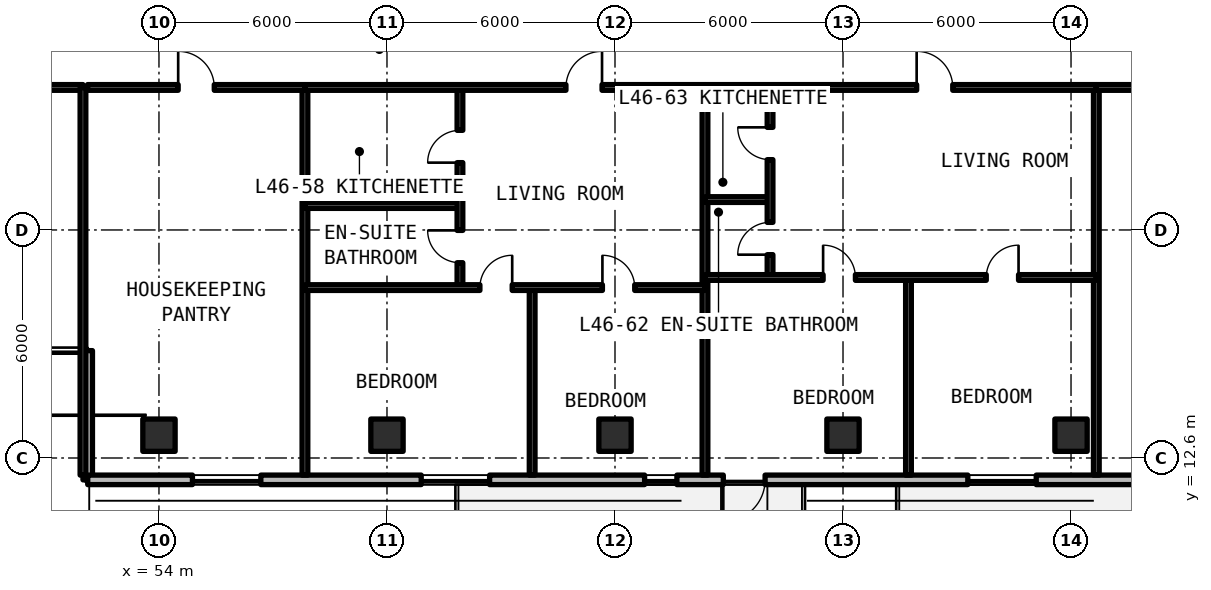
"""IFC4 building model, lengths in metres.
Left out: names, types, materials, properties, quantities, classifications, styles, units other than length and angle.
Written with IfcOpenShell. Run it as: python <this file> out.ifc"""

import sys

from ifc_helpers import new_model, si_unit, direction, frame, frame_2d, origin, origin_2d, place, context, subcontext, project, spatial, rectangle, extrude, element, fill, save


model = new_model("IFC4")
c1 = context("Model", 3, precision=1e-05, world=origin(), true_north=direction((0.0, 1.0)))
c2 = subcontext(c1, "Body", "Model", "MODEL_VIEW")
j1 = project(units=[si_unit("LENGTHUNIT", "METRE"), si_unit("PLANEANGLEUNIT", "RADIAN")], contexts=[c1])
p1 = place(None, origin())
s1 = spatial("IfcSite", under=j1, at=p1, CompositionType="ELEMENT")
p2 = place(p1, origin())
s2 = spatial("IfcBuilding", under=s1, at=p2, CompositionType="ELEMENT")
p3 = place(p2, frame((0.0, 0.0, 165.66)))
s3 = spatial("IfcBuildingStorey", under=s2, at=p3, CompositionType="ELEMENT", Elevation=165.66)
for number, where, z_axis, x_axis in (
    (1, (54.0, 13.2, 0.0), (0.0, 0.0, 1.0), (1.0, 0.0, 0.0)),
    (2, (60.0, 13.2, 0.0), (0.0, 0.0, 1.0), (1.0, 0.0, 0.0)),
    (3, (66.0, 13.2, 0.0), (0.0, 0.0, 1.0), (1.0, 0.0, 0.0)),
    (4, (72.0, 13.2, 0.0), (0.0, 0.0, 1.0), (1.0, 0.0, 0.0)),
    (5, (78.0, 13.2, 0.0), (0.0, 0.0, 1.0), (1.0, 0.0, 0.0)),
):
    element("IfcColumn", number, at=place(p3, frame(where, z_axis=z_axis, x_axis=x_axis)), inside=s3, PredefinedType="COLUMN", context=c2, shape_type="SweptSolid", body=[
        extrude(rectangle(XDim=0.85, YDim=0.85, at=origin_2d()), origin(), (0.0, 0.0, 1.0), 3.63),
    ])
p4 = place(p3, frame((52.125, 15.425, 0.0), z_axis=(0.0, 0.0, 1.0), x_axis=(0.0, -1.0, 0.0)))
e6 = element("IfcWall", 6, at=p4, inside=s3, PredefinedType="SOLIDWALL", context=c2, shape_type="SweptSolid", body=[
    extrude(rectangle(XDim=3.4, YDim=0.25, at=frame_2d((1.7, 0.0))), origin(), (0.0, 0.0, 1.0), 3.41),
])
p5 = place(p3, frame((52.125, 12.025, 0.0), z_axis=(0.0, 0.0, 1.0), x_axis=(1.0, 0.0, 0.0)))
e7 = element("IfcWall", 7, at=p5, inside=s3, PredefinedType="SOLIDWALL", context=c2, shape_type="SweptSolid", body=[
    extrude(rectangle(XDim=43.623, YDim=0.25, at=frame_2d((21.812, 0.0))), origin(), (0.0, 0.0, 1.0), 3.41),
])
p6 = place(p5, frame((16.725, 0.0, 0.0)))
e8 = element("IfcOpeningElement", 8, at=p6, cuts=e7, PredefinedType="OPENING", context=c2, shape_type="SweptSolid", body=[
    extrude(rectangle(XDim=1.1, YDim=2.15, at=frame_2d((0.55, 1.075))), frame((0.0, 0.135, 0.0), z_axis=(0.0, -1.0, 0.0), x_axis=(1.0, 0.0, 0.0)), (0.0, 0.0, 1.0), 0.27),
])
p7 = place(p5, frame((27.575, 0.0, 0.0)))
e9 = element("IfcOpeningElement", 9, at=p7, cuts=e7, PredefinedType="OPENING", context=c2, shape_type="SweptSolid", body=[
    extrude(rectangle(XDim=1.1, YDim=2.15, at=frame_2d((0.55, 1.075))), frame((0.0, 0.135, 0.0), z_axis=(0.0, -1.0, 0.0), x_axis=(1.0, 0.0, 0.0)), (0.0, 0.0, 1.0), 0.27),
])
p8 = place(p5, frame((2.756, 0.0, 0.78)))
e10 = element("IfcOpeningElement", 10, at=p8, cuts=e7, PredefinedType="OPENING", context=c2, shape_type="SweptSolid", body=[
    extrude(rectangle(XDim=1.8, YDim=1.66, at=frame_2d((0.9, 0.83))), frame((0.0, 0.135, 0.0), z_axis=(0.0, -1.0, 0.0), x_axis=(1.0, 0.0, 0.0)), (0.0, 0.0, 1.0), 0.27),
])
p9 = place(p5, frame((8.776, 0.0, 0.78)))
e11 = element("IfcOpeningElement", 11, at=p9, cuts=e7, PredefinedType="OPENING", context=c2, shape_type="SweptSolid", body=[
    extrude(rectangle(XDim=1.8, YDim=1.66, at=frame_2d((0.9, 0.83))), frame((0.0, 0.135, 0.0), z_axis=(0.0, -1.0, 0.0), x_axis=(1.0, 0.0, 0.0)), (0.0, 0.0, 1.0), 0.27),
])
p10 = place(p5, frame((14.654, 0.0, 0.78)))
e12 = element("IfcOpeningElement", 12, at=p10, cuts=e7, PredefinedType="OPENING", context=c2, shape_type="SweptSolid", body=[
    extrude(rectangle(XDim=0.85, YDim=1.65, at=frame_2d((0.425, 0.825))), frame((0.0, 0.135, 0.0), z_axis=(0.0, -1.0, 0.0), x_axis=(1.0, 0.0, 0.0)), (0.0, 0.0, 1.0), 0.27),
])
p11 = place(p5, frame((23.159, 0.0, 0.78)))
e13 = element("IfcOpeningElement", 13, at=p11, cuts=e7, PredefinedType="OPENING", context=c2, shape_type="SweptSolid", body=[
    extrude(rectangle(XDim=1.8, YDim=1.66, at=frame_2d((0.9, 0.83))), frame((0.0, 0.135, 0.0), z_axis=(0.0, -1.0, 0.0), x_axis=(1.0, 0.0, 0.0)), (0.0, 0.0, 1.0), 0.27),
])
p12 = place(p5, frame((38.451, 0.0, 0.78)))
e14 = element("IfcOpeningElement", 14, at=p12, cuts=e7, PredefinedType="OPENING", context=c2, shape_type="SweptSolid", body=[
    extrude(rectangle(XDim=0.85, YDim=1.65, at=frame_2d((0.425, 0.825))), frame((0.0, 0.135, 0.0), z_axis=(0.0, -1.0, 0.0), x_axis=(1.0, 0.0, 0.0)), (0.0, 0.0, 1.0), 0.27),
])
p13 = place(p5, frame((40.725, 0.0, 0.78)))
e15 = element("IfcOpeningElement", 15, at=p13, cuts=e7, PredefinedType="OPENING", context=c2, shape_type="SweptSolid", body=[
    extrude(rectangle(XDim=1.8, YDim=1.66, at=frame_2d((0.9, 0.83))), frame((0.0, 0.135, 0.0), z_axis=(0.0, -1.0, 0.0), x_axis=(1.0, 0.0, 0.0)), (0.0, 0.0, 1.0), 0.27),
])
p14 = place(p3, frame((43.6, 22.35, 0.0), z_axis=(0.0, 0.0, 1.0), x_axis=(1.0, 0.0, 0.0)))
e16 = element("IfcWall", 16, at=p14, inside=s3, PredefinedType="SOLIDWALL", context=c2, shape_type="SweptSolid", body=[
    extrude(rectangle(XDim=8.4, YDim=0.15, at=frame_2d((4.2, 0.0))), origin(), (0.0, 0.0, 1.0), 2.63),
])
p15 = place(p14, frame((3.65, 0.0, 0.0)))
e17 = element("IfcOpeningElement", 17, at=p15, cuts=e16, PredefinedType="OPENING", context=c2, shape_type="SweptSolid", body=[
    extrude(rectangle(XDim=1.1, YDim=2.15, at=frame_2d((0.55, 1.075))), frame((0.0, 0.085, 0.0), z_axis=(0.0, -1.0, 0.0), x_axis=(1.0, 0.0, 0.0)), (0.0, 0.0, 1.0), 0.17),
])
for number, where, z_axis, x_axis in (
    (18, (52.0, 12.15, 0.0), (0.0, 0.0, 1.0), (0.0, 1.0, 0.0)),
    (19, (57.841, 12.15, 0.0), (0.0, 0.0, 1.0), (0.0, 1.0, 0.0)),
):
    element("IfcWall", number, at=place(p3, frame(where, z_axis=z_axis, x_axis=x_axis)), inside=s3, PredefinedType="SOLIDWALL", context=c2, shape_type="SweptSolid", body=[
        extrude(rectangle(XDim=10.2, YDim=0.15, at=frame_2d((5.1, 0.0))), origin(), (0.0, 0.0, 1.0), 2.63),
    ])
p16 = place(p3, frame((52.12, 22.35, 0.0), z_axis=(0.0, 0.0, 1.0), x_axis=(1.0, 0.0, 0.0)))
e20 = element("IfcWall", 20, at=p16, inside=s3, PredefinedType="SOLIDWALL", context=c2, shape_type="SweptSolid", body=[
    extrude(rectangle(XDim=5.721, YDim=0.15, at=frame_2d((2.86, 0.0))), origin(), (0.0, 0.0, 1.0), 2.63),
])
p17 = place(p16, frame((2.385, 0.0, 0.0)))
e21 = element("IfcOpeningElement", 21, at=p17, cuts=e20, PredefinedType="OPENING", context=c2, shape_type="SweptSolid", body=[
    extrude(rectangle(XDim=0.95, YDim=2.15, at=frame_2d((0.475, 1.075))), frame((0.0, 0.085, 0.0), z_axis=(0.0, -1.0, 0.0), x_axis=(1.0, 0.0, 0.0)), (0.0, 0.0, 1.0), 0.17),
])
p18 = place(p3, frame((68.368, 12.15, 0.0), z_axis=(0.0, 0.0, 1.0), x_axis=(0.0, 1.0, 0.0)))
e22 = element("IfcWall", 22, at=p18, inside=s3, PredefinedType="SOLIDWALL", context=c2, shape_type="SweptSolid", body=[
    extrude(rectangle(XDim=10.2, YDim=0.15, at=frame_2d((5.1, 0.0))), origin(), (0.0, 0.0, 1.0), 2.63),
])
p19 = place(p3, frame((57.841, 19.243, 0.0), z_axis=(0.0, 0.0, 1.0), x_axis=(1.0, 0.0, 0.0)))
e23 = element("IfcWall", 23, at=p19, inside=s3, PredefinedType="PARTITIONING", context=c2, shape_type="SweptSolid", body=[
    extrude(rectangle(XDim=4.079, YDim=0.15, at=frame_2d((2.04, 0.0))), origin(), (0.0, 0.0, 1.0), 2.63),
])
p20 = place(p3, frame((61.92, 17.084, 0.0), z_axis=(0.0, 0.0, 1.0), x_axis=(0.0, 1.0, 0.0)))
e24 = element("IfcWall", 24, at=p20, inside=s3, PredefinedType="PARTITIONING", context=c2, shape_type="SweptSolid", body=[
    extrude(rectangle(XDim=5.266, YDim=0.15, at=frame_2d((2.633, 0.0))), origin(), (0.0, 0.0, 1.0), 2.63),
])
p21 = place(p20, frame((0.655, 0.0, 0.0)))
e25 = element("IfcOpeningElement", 25, at=p21, cuts=e24, PredefinedType="OPENING", context=c2, shape_type="SweptSolid", body=[
    extrude(rectangle(XDim=0.85, YDim=2.1, at=frame_2d((0.425, 1.05))), frame((0.0, 0.085, 0.0), z_axis=(0.0, -1.0, 0.0), x_axis=(1.0, 0.0, 0.0)), (0.0, 0.0, 1.0), 0.17),
])
p22 = place(p20, frame((3.288, 0.0, 0.0)))
e26 = element("IfcOpeningElement", 26, at=p22, cuts=e24, PredefinedType="OPENING", context=c2, shape_type="SweptSolid", body=[
    extrude(rectangle(XDim=0.85, YDim=2.1, at=frame_2d((0.425, 1.05))), frame((0.0, 0.085, 0.0), z_axis=(0.0, -1.0, 0.0), x_axis=(1.0, 0.0, 0.0)), (0.0, 0.0, 1.0), 0.17),
])
p23 = place(p3, frame((63.82, 12.15, 0.0), z_axis=(0.0, 0.0, 1.0), x_axis=(0.0, 1.0, 0.0)))
e27 = element("IfcWall", 27, at=p23, inside=s3, PredefinedType="PARTITIONING", context=c2, shape_type="SweptSolid", body=[
    extrude(rectangle(XDim=4.934, YDim=0.15, at=frame_2d((2.467, 0.0))), origin(), (0.0, 0.0, 1.0), 2.63),
])
p24 = place(p3, frame((57.841, 17.084, 0.0), z_axis=(0.0, 0.0, 1.0), x_axis=(1.0, 0.0, 0.0)))
e28 = element("IfcWall", 28, at=p24, inside=s3, PredefinedType="PARTITIONING", context=c2, shape_type="SweptSolid", body=[
    extrude(rectangle(XDim=10.527, YDim=0.15, at=frame_2d((5.263, 0.0))), origin(), (0.0, 0.0, 1.0), 2.63),
])
p25 = place(p24, frame((4.604, 0.0, 0.0)))
e29 = element("IfcOpeningElement", 29, at=p25, cuts=e28, PredefinedType="OPENING", context=c2, shape_type="SweptSolid", body=[
    extrude(rectangle(XDim=0.85, YDim=2.1, at=frame_2d((0.425, 1.05))), frame((0.0, 0.085, 0.0), z_axis=(0.0, -1.0, 0.0), x_axis=(1.0, 0.0, 0.0)), (0.0, 0.0, 1.0), 0.17),
])
p26 = place(p24, frame((7.828, 0.0, 0.0)))
e30 = element("IfcOpeningElement", 30, at=p26, cuts=e28, PredefinedType="OPENING", context=c2, shape_type="SweptSolid", body=[
    extrude(rectangle(XDim=0.85, YDim=2.1, at=frame_2d((0.425, 1.05))), frame((0.0, 0.085, 0.0), z_axis=(0.0, -1.0, 0.0), x_axis=(1.0, 0.0, 0.0)), (0.0, 0.0, 1.0), 0.17),
])
p27 = place(p3, frame((57.841, 22.35, 0.0), z_axis=(0.0, 0.0, 1.0), x_axis=(1.0, 0.0, 0.0)))
e31 = element("IfcWall", 31, at=p27, inside=s3, PredefinedType="SOLIDWALL", context=c2, shape_type="SweptSolid", body=[
    extrude(rectangle(XDim=10.527, YDim=0.15, at=frame_2d((5.263, 0.0))), origin(), (0.0, 0.0, 1.0), 2.63),
])
p28 = place(p27, frame((6.868, 0.0, 0.0)))
e32 = element("IfcOpeningElement", 32, at=p28, cuts=e31, PredefinedType="OPENING", context=c2, shape_type="SweptSolid", body=[
    extrude(rectangle(XDim=0.95, YDim=2.15, at=frame_2d((0.475, 1.075))), frame((0.0, 0.085, 0.0), z_axis=(0.0, -1.0, 0.0), x_axis=(1.0, 0.0, 0.0)), (0.0, 0.0, 1.0), 0.17),
])
p29 = place(p3, frame((78.666, 12.15, 0.0), z_axis=(0.0, 0.0, 1.0), x_axis=(0.0, 1.0, 0.0)))
e33 = element("IfcWall", 33, at=p29, inside=s3, PredefinedType="SOLIDWALL", context=c2, shape_type="SweptSolid", body=[
    extrude(rectangle(XDim=10.2, YDim=0.15, at=frame_2d((5.1, 0.0))), origin(), (0.0, 0.0, 1.0), 2.63),
])
p30 = place(p3, frame((68.368, 19.4, 0.0), z_axis=(0.0, 0.0, 1.0), x_axis=(1.0, 0.0, 0.0)))
e34 = element("IfcWall", 34, at=p30, inside=s3, PredefinedType="PARTITIONING", context=c2, shape_type="SweptSolid", body=[
    extrude(rectangle(XDim=1.712, YDim=0.15, at=frame_2d((0.856, 0.0))), origin(), (0.0, 0.0, 1.0), 2.63),
])
p31 = place(p3, frame((70.08, 17.35, 0.0), z_axis=(0.0, 0.0, 1.0), x_axis=(0.0, 1.0, 0.0)))
e35 = element("IfcWall", 35, at=p31, inside=s3, PredefinedType="PARTITIONING", context=c2, shape_type="SweptSolid", body=[
    extrude(rectangle(XDim=5.0, YDim=0.15, at=frame_2d((2.5, 0.0))), origin(), (0.0, 0.0, 1.0), 2.63),
])
p32 = place(p31, frame((0.6, 0.0, 0.0)))
e36 = element("IfcOpeningElement", 36, at=p32, cuts=e35, PredefinedType="OPENING", context=c2, shape_type="SweptSolid", body=[
    extrude(rectangle(XDim=0.85, YDim=2.1, at=frame_2d((0.425, 1.05))), frame((0.0, 0.085, 0.0), z_axis=(0.0, -1.0, 0.0), x_axis=(1.0, 0.0, 0.0)), (0.0, 0.0, 1.0), 0.17),
])
p33 = place(p31, frame((3.1, 0.0, 0.0)))
e37 = element("IfcOpeningElement", 37, at=p33, cuts=e35, PredefinedType="OPENING", context=c2, shape_type="SweptSolid", body=[
    extrude(rectangle(XDim=0.85, YDim=2.1, at=frame_2d((0.425, 1.05))), frame((0.0, 0.085, 0.0), z_axis=(0.0, -1.0, 0.0), x_axis=(1.0, 0.0, 0.0)), (0.0, 0.0, 1.0), 0.17),
])
p34 = place(p3, frame((73.723, 12.15, 0.0), z_axis=(0.0, 0.0, 1.0), x_axis=(0.0, 1.0, 0.0)))
e38 = element("IfcWall", 38, at=p34, inside=s3, PredefinedType="PARTITIONING", context=c2, shape_type="SweptSolid", body=[
    extrude(rectangle(XDim=5.2, YDim=0.15, at=frame_2d((2.6, 0.0))), origin(), (0.0, 0.0, 1.0), 2.63),
])
p35 = place(p3, frame((68.368, 17.35, 0.0), z_axis=(0.0, 0.0, 1.0), x_axis=(1.0, 0.0, 0.0)))
e39 = element("IfcWall", 39, at=p35, inside=s3, PredefinedType="PARTITIONING", context=c2, shape_type="SweptSolid", body=[
    extrude(rectangle(XDim=10.298, YDim=0.15, at=frame_2d((5.149, 0.0))), origin(), (0.0, 0.0, 1.0), 2.63),
])
p36 = place(p35, frame((3.109, 0.0, 0.0)))
e40 = element("IfcOpeningElement", 40, at=p36, cuts=e39, PredefinedType="OPENING", context=c2, shape_type="SweptSolid", body=[
    extrude(rectangle(XDim=0.85, YDim=2.1, at=frame_2d((0.425, 1.05))), frame((0.0, 0.085, 0.0), z_axis=(0.0, -1.0, 0.0), x_axis=(1.0, 0.0, 0.0)), (0.0, 0.0, 1.0), 0.17),
])
p37 = place(p35, frame((7.401, 0.0, 0.0)))
e41 = element("IfcOpeningElement", 41, at=p37, cuts=e39, PredefinedType="OPENING", context=c2, shape_type="SweptSolid", body=[
    extrude(rectangle(XDim=0.85, YDim=2.1, at=frame_2d((0.425, 1.05))), frame((0.0, 0.085, 0.0), z_axis=(0.0, -1.0, 0.0), x_axis=(1.0, 0.0, 0.0)), (0.0, 0.0, 1.0), 0.17),
])
p38 = place(p3, frame((68.368, 22.35, 0.0), z_axis=(0.0, 0.0, 1.0), x_axis=(1.0, 0.0, 0.0)))
e42 = element("IfcWall", 42, at=p38, inside=s3, PredefinedType="SOLIDWALL", context=c2, shape_type="SweptSolid", body=[
    extrude(rectangle(XDim=10.298, YDim=0.15, at=frame_2d((5.149, 0.0))), origin(), (0.0, 0.0, 1.0), 2.63),
])
p39 = place(p38, frame((5.57, 0.0, 0.0)))
e43 = element("IfcOpeningElement", 43, at=p39, cuts=e42, PredefinedType="OPENING", context=c2, shape_type="SweptSolid", body=[
    extrude(rectangle(XDim=0.95, YDim=2.15, at=frame_2d((0.475, 1.075))), frame((0.0, 0.085, 0.0), z_axis=(0.0, -1.0, 0.0), x_axis=(1.0, 0.0, 0.0)), (0.0, 0.0, 1.0), 0.17),
])
p40 = place(p3, frame((78.666, 22.35, 0.0), z_axis=(0.0, 0.0, 1.0), x_axis=(1.0, 0.0, 0.0)))
e44 = element("IfcWall", 44, at=p40, inside=s3, PredefinedType="SOLIDWALL", context=c2, shape_type="SweptSolid", body=[
    extrude(rectangle(XDim=10.756, YDim=0.15, at=frame_2d((5.378, 0.0))), origin(), (0.0, 0.0, 1.0), 2.63),
])
p41 = place(p40, frame((4.828, 0.0, 0.0)))
e45 = element("IfcOpeningElement", 45, at=p41, cuts=e44, PredefinedType="OPENING", context=c2, shape_type="SweptSolid", body=[
    extrude(rectangle(XDim=1.1, YDim=2.15, at=frame_2d((0.55, 1.075))), frame((0.0, 0.085, 0.0), z_axis=(0.0, -1.0, 0.0), x_axis=(1.0, 0.0, 0.0)), (0.0, 0.0, 1.0), 0.17),
])
p42 = place(p6, frame((1.1, 0.0, 0.0), z_axis=(0.0, 0.0, 1.0), x_axis=(-1.0, 0.0, 0.0)))
e46 = element("IfcDoor", 46, at=p42, inside=s3, OperationType="SINGLE_SWING_LEFT", PredefinedType="DOOR", context=c2, shape_type="SweptSolid", body=[
    extrude(rectangle(XDim=1.1, YDim=2.15, at=frame_2d((0.55, 1.075))), frame((0.0, 0.025, 0.0), z_axis=(0.0, -1.0, 0.0), x_axis=(1.0, 0.0, 0.0)), (0.0, 0.0, 1.0), 0.05),
])
fill(e8, e46)
p43 = place(p8, origin())
e47 = element("IfcWindow", 47, at=p43, inside=s3, PartitioningType="SINGLE_PANEL", PredefinedType="WINDOW", context=c2, shape_type="SweptSolid", body=[
    extrude(rectangle(XDim=1.8, YDim=1.66, at=frame_2d((0.9, 0.83))), frame((0.0, 0.03, 0.0), z_axis=(0.0, -1.0, 0.0), x_axis=(1.0, 0.0, 0.0)), (0.0, 0.0, 1.0), 0.06),
])
fill(e10, e47)
p44 = place(p9, origin())
e48 = element("IfcWindow", 48, at=p44, inside=s3, PartitioningType="SINGLE_PANEL", PredefinedType="WINDOW", context=c2, shape_type="SweptSolid", body=[
    extrude(rectangle(XDim=1.8, YDim=1.66, at=frame_2d((0.9, 0.83))), frame((0.0, 0.03, 0.0), z_axis=(0.0, -1.0, 0.0), x_axis=(1.0, 0.0, 0.0)), (0.0, 0.0, 1.0), 0.06),
])
fill(e11, e48)
p45 = place(p10, origin())
e49 = element("IfcWindow", 49, at=p45, inside=s3, PartitioningType="SINGLE_PANEL", PredefinedType="WINDOW", context=c2, shape_type="SweptSolid", body=[
    extrude(rectangle(XDim=0.85, YDim=1.65, at=frame_2d((0.425, 0.825))), frame((0.0, 0.03, 0.0), z_axis=(0.0, -1.0, 0.0), x_axis=(1.0, 0.0, 0.0)), (0.0, 0.0, 1.0), 0.06),
])
fill(e12, e49)
p46 = place(p11, origin())
e50 = element("IfcWindow", 50, at=p46, inside=s3, PartitioningType="SINGLE_PANEL", PredefinedType="WINDOW", context=c2, shape_type="SweptSolid", body=[
    extrude(rectangle(XDim=1.8, YDim=1.66, at=frame_2d((0.9, 0.83))), frame((0.0, 0.03, 0.0), z_axis=(0.0, -1.0, 0.0), x_axis=(1.0, 0.0, 0.0)), (0.0, 0.0, 1.0), 0.06),
])
fill(e13, e50)
p47 = place(p17, origin())
e51 = element("IfcDoor", 51, at=p47, inside=s3, OperationType="SINGLE_SWING_LEFT", PredefinedType="DOOR", context=c2, shape_type="SweptSolid", body=[
    extrude(rectangle(XDim=0.95, YDim=2.15, at=frame_2d((0.475, 1.075))), frame((0.0, 0.025, 0.0), z_axis=(0.0, -1.0, 0.0), x_axis=(1.0, 0.0, 0.0)), (0.0, 0.0, 1.0), 0.05),
])
fill(e21, e51)
p48 = place(p21, origin())
e52 = element("IfcDoor", 52, at=p48, inside=s3, OperationType="SINGLE_SWING_RIGHT", PredefinedType="DOOR", context=c2, shape_type="SweptSolid", body=[
    extrude(rectangle(XDim=0.85, YDim=2.1, at=frame_2d((0.425, 1.05))), frame((0.0, 0.025, 0.0), z_axis=(0.0, -1.0, 0.0), x_axis=(1.0, 0.0, 0.0)), (0.0, 0.0, 1.0), 0.05),
])
fill(e25, e52)
p49 = place(p22, origin())
e53 = element("IfcDoor", 53, at=p49, inside=s3, OperationType="SINGLE_SWING_LEFT", PredefinedType="DOOR", context=c2, shape_type="SweptSolid", body=[
    extrude(rectangle(XDim=0.85, YDim=2.1, at=frame_2d((0.425, 1.05))), frame((0.0, 0.025, 0.0), z_axis=(0.0, -1.0, 0.0), x_axis=(1.0, 0.0, 0.0)), (0.0, 0.0, 1.0), 0.05),
])
fill(e26, e53)
p50 = place(p25, origin())
e54 = element("IfcDoor", 54, at=p50, inside=s3, OperationType="SINGLE_SWING_RIGHT", PredefinedType="DOOR", context=c2, shape_type="SweptSolid", body=[
    extrude(rectangle(XDim=0.85, YDim=2.1, at=frame_2d((0.425, 1.05))), frame((0.0, 0.025, 0.0), z_axis=(0.0, -1.0, 0.0), x_axis=(1.0, 0.0, 0.0)), (0.0, 0.0, 1.0), 0.05),
])
fill(e29, e54)
p51 = place(p26, origin())
e55 = element("IfcDoor", 55, at=p51, inside=s3, OperationType="SINGLE_SWING_LEFT", PredefinedType="DOOR", context=c2, shape_type="SweptSolid", body=[
    extrude(rectangle(XDim=0.85, YDim=2.1, at=frame_2d((0.425, 1.05))), frame((0.0, 0.025, 0.0), z_axis=(0.0, -1.0, 0.0), x_axis=(1.0, 0.0, 0.0)), (0.0, 0.0, 1.0), 0.05),
])
fill(e30, e55)
p52 = place(p28, origin())
e56 = element("IfcDoor", 56, at=p52, inside=s3, OperationType="SINGLE_SWING_RIGHT", PredefinedType="DOOR", context=c2, shape_type="SweptSolid", body=[
    extrude(rectangle(XDim=0.95, YDim=2.15, at=frame_2d((0.475, 1.075))), frame((0.0, 0.025, 0.0), z_axis=(0.0, -1.0, 0.0), x_axis=(1.0, 0.0, 0.0)), (0.0, 0.0, 1.0), 0.05),
])
fill(e32, e56)
p53 = place(p32, origin())
e57 = element("IfcDoor", 57, at=p53, inside=s3, OperationType="SINGLE_SWING_LEFT", PredefinedType="DOOR", context=c2, shape_type="SweptSolid", body=[
    extrude(rectangle(XDim=0.85, YDim=2.1, at=frame_2d((0.425, 1.05))), frame((0.0, 0.025, 0.0), z_axis=(0.0, -1.0, 0.0), x_axis=(1.0, 0.0, 0.0)), (0.0, 0.0, 1.0), 0.05),
])
fill(e36, e57)
p54 = place(p33, origin())
e58 = element("IfcDoor", 58, at=p54, inside=s3, OperationType="SINGLE_SWING_RIGHT", PredefinedType="DOOR", context=c2, shape_type="SweptSolid", body=[
    extrude(rectangle(XDim=0.85, YDim=2.1, at=frame_2d((0.425, 1.05))), frame((0.0, 0.025, 0.0), z_axis=(0.0, -1.0, 0.0), x_axis=(1.0, 0.0, 0.0)), (0.0, 0.0, 1.0), 0.05),
])
fill(e37, e58)
p55 = place(p36, origin())
e59 = element("IfcDoor", 59, at=p55, inside=s3, OperationType="SINGLE_SWING_LEFT", PredefinedType="DOOR", context=c2, shape_type="SweptSolid", body=[
    extrude(rectangle(XDim=0.85, YDim=2.1, at=frame_2d((0.425, 1.05))), frame((0.0, 0.025, 0.0), z_axis=(0.0, -1.0, 0.0), x_axis=(1.0, 0.0, 0.0)), (0.0, 0.0, 1.0), 0.05),
])
fill(e40, e59)
p56 = place(p37, origin())
e60 = element("IfcDoor", 60, at=p56, inside=s3, OperationType="SINGLE_SWING_RIGHT", PredefinedType="DOOR", context=c2, shape_type="SweptSolid", body=[
    extrude(rectangle(XDim=0.85, YDim=2.1, at=frame_2d((0.425, 1.05))), frame((0.0, 0.025, 0.0), z_axis=(0.0, -1.0, 0.0), x_axis=(1.0, 0.0, 0.0)), (0.0, 0.0, 1.0), 0.05),
])
fill(e41, e60)
p57 = place(p39, origin())
e61 = element("IfcDoor", 61, at=p57, inside=s3, OperationType="SINGLE_SWING_LEFT", PredefinedType="DOOR", context=c2, shape_type="SweptSolid", body=[
    extrude(rectangle(XDim=0.95, YDim=2.15, at=frame_2d((0.475, 1.075))), frame((0.0, 0.025, 0.0), z_axis=(0.0, -1.0, 0.0), x_axis=(1.0, 0.0, 0.0)), (0.0, 0.0, 1.0), 0.05),
])
fill(e43, e61)
save(model, sys.argv[1])
